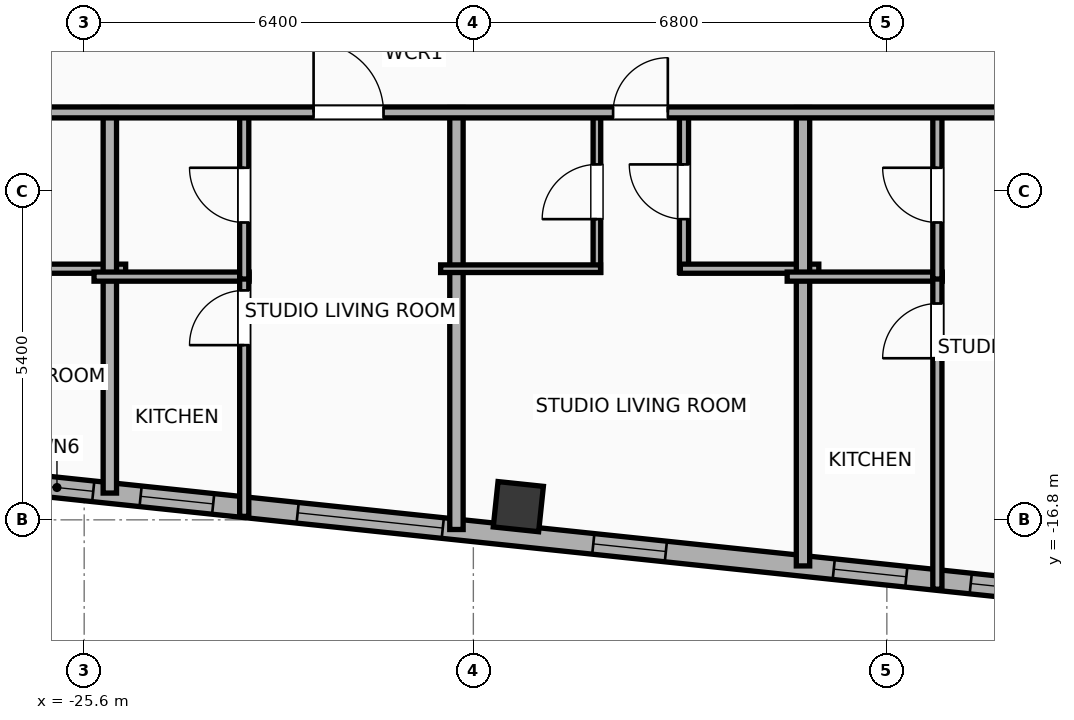
"""IFC4 building model, lengths in metres.
Left out: names, types, materials, properties, quantities, classifications, styles, units other than length and angle.
Written with IfcOpenShell. Run it as: python <this file> out.ifc"""

import sys

from ifc_helpers import new_model, si_unit, direction, frame, frame_2d, origin, origin_2d, place, context, subcontext, project, spatial, rectangle, hollow_rectangle, extrude, element, fill, save


model = new_model("IFC4")
c1 = context("Model", 3, precision=1e-05, world=origin(), true_north=direction((0.0, 1.0)))
c2 = subcontext(c1, "Body", "Model", "MODEL_VIEW")
j1 = project(units=[si_unit("LENGTHUNIT", "METRE"), si_unit("PLANEANGLEUNIT", "RADIAN")], contexts=[c1])
p1 = place(None, origin())
s1 = spatial("IfcSite", under=j1, at=p1, CompositionType="ELEMENT")
p2 = place(p1, origin())
s2 = spatial("IfcBuilding", under=s1, at=p2, CompositionType="ELEMENT")
p3 = place(p2, frame((0.0, 0.0, 271.7)))
s3 = spatial("IfcBuildingStorey", under=s2, at=p3, CompositionType="ELEMENT", Elevation=271.7)
p4 = place(p3, frame((-18.46, -16.583, 0.0), z_axis=(0.0, 0.0, 1.0), x_axis=(0.994521895368, -0.104528463268, 0.0)))
e1 = element("IfcColumn", 1, at=p4, inside=s3, PredefinedType="COLUMN", context=c2, shape_type="SweptSolid", body=[
    extrude(hollow_rectangle(XDim=0.75, YDim=0.75, WallThickness=0.025, at=origin_2d()), origin(), (0.0, 0.0, 1.0), 3.9),
])
p5 = place(p3, frame((18.708, -20.972, 0.0), z_axis=(0.0, 0.0, 1.0), x_axis=(-0.994521888554, 0.104528528102, 0.0)))
e2 = element("IfcWall", 2, at=p5, inside=s3, PredefinedType="ELEMENTEDWALL", context=c2, shape_type="SweptSolid", body=[
    extrude(rectangle(XDim=46.766, YDim=0.34, at=frame_2d((23.383, 0.0))), origin(), (0.0, 0.0, 1.0), 3.65),
])
p6 = place(p5, frame((23.833, 0.0, 0.75)))
e3 = element("IfcOpeningElement", 3, at=p6, cuts=e2, PredefinedType="OPENING", context=c2, shape_type="SweptSolid", body=[
    extrude(rectangle(XDim=2.4, YDim=2.1, at=frame_2d((1.2, 1.05))), frame((0.0, 0.18, 0.0), z_axis=(0.0, -1.0, 0.0), x_axis=(1.0, 0.0, 0.0)), (0.0, 0.0, 1.0), 0.36),
])
p7 = place(p5, frame((38.622, 0.0, 0.75)))
e4 = element("IfcOpeningElement", 4, at=p7, cuts=e2, PredefinedType="OPENING", context=c2, shape_type="SweptSolid", body=[
    extrude(rectangle(XDim=2.4, YDim=2.1, at=frame_2d((1.2, 1.05))), frame((0.0, 0.18, 0.0), z_axis=(0.0, -1.0, 0.0), x_axis=(1.0, 0.0, 0.0)), (0.0, 0.0, 1.0), 0.36),
])
p8 = place(p5, frame((44.402, 0.0, 0.75)))
e5 = element("IfcOpeningElement", 5, at=p8, cuts=e2, PredefinedType="OPENING", context=c2, shape_type="SweptSolid", body=[
    extrude(rectangle(XDim=1.2, YDim=2.05, at=frame_2d((0.6, 1.025))), frame((0.0, 0.18, 0.0), z_axis=(0.0, -1.0, 0.0), x_axis=(1.0, 0.0, 0.0)), (0.0, 0.0, 1.0), 0.36),
])
p9 = place(p5, frame((42.419, 0.0, 0.75)))
e6 = element("IfcOpeningElement", 6, at=p9, cuts=e2, PredefinedType="OPENING", context=c2, shape_type="SweptSolid", body=[
    extrude(rectangle(XDim=1.2, YDim=2.05, at=frame_2d((0.6, 1.025))), frame((0.0, 0.18, 0.0), z_axis=(0.0, -1.0, 0.0), x_axis=(1.0, 0.0, 0.0)), (0.0, 0.0, 1.0), 0.36),
])
p10 = place(p5, frame((34.933, 0.0, 0.75)))
e7 = element("IfcOpeningElement", 7, at=p10, cuts=e2, PredefinedType="OPENING", context=c2, shape_type="SweptSolid", body=[
    extrude(rectangle(XDim=1.2, YDim=2.05, at=frame_2d((0.6, 1.025))), frame((0.0, 0.18, 0.0), z_axis=(0.0, -1.0, 0.0), x_axis=(1.0, 0.0, 0.0)), (0.0, 0.0, 1.0), 0.36),
])
p11 = place(p5, frame((28.692, 0.0, 0.75)))
e8 = element("IfcOpeningElement", 8, at=p11, cuts=e2, PredefinedType="OPENING", context=c2, shape_type="SweptSolid", body=[
    extrude(rectangle(XDim=1.2, YDim=2.05, at=frame_2d((0.6, 1.025))), frame((0.0, 0.18, 0.0), z_axis=(0.0, -1.0, 0.0), x_axis=(1.0, 0.0, 0.0)), (0.0, 0.0, 1.0), 0.36),
])
p12 = place(p5, frame((30.957, 0.0, 0.75)))
e9 = element("IfcOpeningElement", 9, at=p12, cuts=e2, PredefinedType="OPENING", context=c2, shape_type="SweptSolid", body=[
    extrude(rectangle(XDim=1.2, YDim=2.05, at=frame_2d((0.6, 1.025))), frame((0.0, 0.18, 0.0), z_axis=(0.0, -1.0, 0.0), x_axis=(1.0, 0.0, 0.0)), (0.0, 0.0, 1.0), 0.36),
])
p13 = place(p5, frame((7.492, 0.0, 0.75)))
e10 = element("IfcOpeningElement", 10, at=p13, cuts=e2, PredefinedType="OPENING", context=c2, shape_type="SweptSolid", body=[
    extrude(rectangle(XDim=1.2, YDim=2.05, at=frame_2d((0.6, 1.025))), frame((0.0, 0.18, 0.0), z_axis=(0.0, -1.0, 0.0), x_axis=(1.0, 0.0, 0.0)), (0.0, 0.0, 1.0), 0.36),
])
p14 = place(p5, frame((4.141, 0.0, 0.75)))
e11 = element("IfcOpeningElement", 11, at=p14, cuts=e2, PredefinedType="OPENING", context=c2, shape_type="SweptSolid", body=[
    extrude(rectangle(XDim=1.2, YDim=2.05, at=frame_2d((0.6, 1.025))), frame((0.0, 0.18, 0.0), z_axis=(0.0, -1.0, 0.0), x_axis=(1.0, 0.0, 0.0)), (0.0, 0.0, 1.0), 0.36),
])
p15 = place(p5, frame((1.36, 0.0, 0.75)))
e12 = element("IfcOpeningElement", 12, at=p15, cuts=e2, PredefinedType="OPENING", context=c2, shape_type="SweptSolid", body=[
    extrude(rectangle(XDim=1.2, YDim=2.05, at=frame_2d((0.6, 1.025))), frame((0.0, 0.18, 0.0), z_axis=(0.0, -1.0, 0.0), x_axis=(1.0, 0.0, 0.0)), (0.0, 0.0, 1.0), 0.36),
])
p16 = place(p5, frame((20.254, 0.0, 0.75)))
e13 = element("IfcOpeningElement", 13, at=p16, cuts=e2, PredefinedType="OPENING", context=c2, shape_type="SweptSolid", body=[
    extrude(rectangle(XDim=1.2, YDim=2.05, at=frame_2d((0.6, 1.025))), frame((0.0, 0.18, 0.0), z_axis=(0.0, -1.0, 0.0), x_axis=(1.0, 0.0, 0.0)), (0.0, 0.0, 1.0), 0.36),
])
p17 = place(p5, frame((16.172, 0.0, 0.75)))
e14 = element("IfcOpeningElement", 14, at=p17, cuts=e2, PredefinedType="OPENING", context=c2, shape_type="SweptSolid", body=[
    extrude(rectangle(XDim=1.2, YDim=2.05, at=frame_2d((0.6, 1.025))), frame((0.0, 0.18, 0.0), z_axis=(0.0, -1.0, 0.0), x_axis=(1.0, 0.0, 0.0)), (0.0, 0.0, 1.0), 0.36),
])
p18 = place(p5, frame((12.11, 0.0, 0.75)))
e15 = element("IfcOpeningElement", 15, at=p18, cuts=e2, PredefinedType="OPENING", context=c2, shape_type="SweptSolid", body=[
    extrude(rectangle(XDim=1.2, YDim=2.05, at=frame_2d((0.6, 1.025))), frame((0.0, 0.18, 0.0), z_axis=(0.0, -1.0, 0.0), x_axis=(1.0, 0.0, 0.0)), (0.0, 0.0, 1.0), 0.36),
])
p19 = place(p3, frame((-27.215, -12.67, 0.0), z_axis=(0.0, 0.0, 1.0), x_axis=(1.0, 0.0, 0.0)))
e16 = element("IfcWall", 16, at=p19, inside=s3, PredefinedType="PLUMBINGWALL", context=c2, shape_type="SweptSolid", body=[
    extrude(rectangle(XDim=2.297, YDim=0.15, at=frame_2d((1.148, 0.0))), origin(), (0.0, 0.0, 1.0), 3.65),
])
p20 = place(p3, frame((-25.178, -16.36, 0.0), z_axis=(0.0, 0.0, 1.0), x_axis=(0.0, 1.0, 0.0)))
e17 = element("IfcWall", 17, at=p20, inside=s3, PredefinedType="PARTITIONING", context=c2, shape_type="SweptSolid", body=[
    extrude(rectangle(XDim=6.34, YDim=0.22, at=frame_2d((3.17, 0.0))), origin(), (0.0, 0.0, 1.0), 3.65),
])
p21 = place(p3, frame((-25.438, -12.8, 0.0), z_axis=(0.0, 0.0, 1.0), x_axis=(1.0, 0.0, 0.0)))
e18 = element("IfcWall", 18, at=p21, inside=s3, PredefinedType="PLUMBINGWALL", context=c2, shape_type="SweptSolid", body=[
    extrude(rectangle(XDim=2.55, YDim=0.15, at=frame_2d((1.275, 0.0))), origin(), (0.0, 0.0, 1.0), 3.65),
])
p22 = place(p3, frame((-22.968, -16.743, 0.0), z_axis=(0.0, 0.0, 1.0), x_axis=(0.0, 1.0, 0.0)))
e19 = element("IfcWall", 19, at=p22, inside=s3, PredefinedType="PLUMBINGWALL", context=c2, shape_type="SweptSolid", body=[
    extrude(rectangle(XDim=3.983, YDim=0.15, at=frame_2d((1.991, 0.0))), origin(), (0.0, 0.0, 1.0), 3.65),
])
p23 = place(p22, frame((2.816, 0.0, 0.0)))
e20 = element("IfcOpeningElement", 20, at=p23, cuts=e19, PredefinedType="OPENING", context=c2, shape_type="SweptSolid", body=[
    extrude(rectangle(XDim=0.9, YDim=2.05, at=frame_2d((0.45, 1.025))), frame((0.0, 0.085, 0.0), z_axis=(0.0, -1.0, 0.0), x_axis=(1.0, 0.0, 0.0)), (0.0, 0.0, 1.0), 0.17),
])
p24 = place(p3, frame((-22.968, -12.84, 0.0), z_axis=(0.0, 0.0, 1.0), x_axis=(0.0, 1.0, 0.0)))
e21 = element("IfcWall", 21, at=p24, inside=s3, PredefinedType="PLUMBINGWALL", context=c2, shape_type="SweptSolid", body=[
    extrude(rectangle(XDim=2.76, YDim=0.15, at=frame_2d((1.38, 0.0))), origin(), (0.0, 0.0, 1.0), 3.65),
])
p25 = place(p24, frame((0.93, 0.0, 0.0)))
e22 = element("IfcOpeningElement", 22, at=p25, cuts=e21, PredefinedType="OPENING", context=c2, shape_type="SweptSolid", body=[
    extrude(rectangle(XDim=0.9, YDim=2.05, at=frame_2d((0.45, 1.025))), frame((0.0, 0.085, 0.0), z_axis=(0.0, -1.0, 0.0), x_axis=(1.0, 0.0, 0.0)), (0.0, 0.0, 1.0), 0.17),
])
p26 = place(p3, frame((-19.478, -16.959, 0.0), z_axis=(0.0, 0.0, 1.0), x_axis=(0.0, 1.0, 0.0)))
e23 = element("IfcWall", 23, at=p26, inside=s3, PredefinedType="PARTITIONING", context=c2, shape_type="SweptSolid", body=[
    extrude(rectangle(XDim=6.939, YDim=0.22, at=frame_2d((3.469, 0.0))), origin(), (0.0, 0.0, 1.0), 3.65),
])
p27 = place(p3, frame((-17.168, -12.73, 0.0), z_axis=(0.0, 0.0, 1.0), x_axis=(0.0, 1.0, 0.0)))
e24 = element("IfcWall", 24, at=p27, inside=s3, PredefinedType="PARTITIONING", context=c2, shape_type="SweptSolid", body=[
    extrude(rectangle(XDim=2.65, YDim=0.125, at=frame_2d((1.325, 0.0))), origin(), (0.0, 0.0, 1.0), 3.65),
])
p28 = place(p27, frame((0.875, 0.0, 0.0)))
e25 = element("IfcOpeningElement", 25, at=p28, cuts=e24, PredefinedType="OPENING", context=c2, shape_type="SweptSolid", body=[
    extrude(rectangle(XDim=0.9, YDim=2.05, at=frame_2d((0.45, 1.025))), frame((0.0, 0.073, 0.0), z_axis=(0.0, -1.0, 0.0), x_axis=(1.0, 0.0, 0.0)), (0.0, 0.0, 1.0), 0.145),
])
p29 = place(p3, frame((-15.736, -12.73, 0.0), z_axis=(0.0, 0.0, 1.0), x_axis=(0.0, 1.0, 0.0)))
e26 = element("IfcWall", 26, at=p29, inside=s3, PredefinedType="PLUMBINGWALL", context=c2, shape_type="SweptSolid", body=[
    extrude(rectangle(XDim=2.65, YDim=0.15, at=frame_2d((1.325, 0.0))), origin(), (0.0, 0.0, 1.0), 3.65),
])
p30 = place(p29, frame((0.875, 0.0, 0.0)))
e27 = element("IfcOpeningElement", 27, at=p30, cuts=e26, PredefinedType="OPENING", context=c2, shape_type="SweptSolid", body=[
    extrude(rectangle(XDim=0.9, YDim=2.05, at=frame_2d((0.45, 1.025))), frame((0.0, 0.085, 0.0), z_axis=(0.0, -1.0, 0.0), x_axis=(1.0, 0.0, 0.0)), (0.0, 0.0, 1.0), 0.17),
])
p31 = place(p3, frame((-19.738, -12.67, 0.0), z_axis=(0.0, 0.0, 1.0), x_axis=(1.0, 0.0, 0.0)))
e28 = element("IfcWall", 28, at=p31, inside=s3, PredefinedType="PARTITIONING", context=c2, shape_type="SweptSolid", body=[
    extrude(rectangle(XDim=2.63, YDim=0.125, at=frame_2d((1.315, 0.0))), origin(), (0.0, 0.0, 1.0), 3.65),
])
p32 = place(p3, frame((-15.796, -12.67, 0.0), z_axis=(0.0, 0.0, 1.0), x_axis=(1.0, 0.0, 0.0)))
e29 = element("IfcWall", 29, at=p32, inside=s3, PredefinedType="PLUMBINGWALL", context=c2, shape_type="SweptSolid", body=[
    extrude(rectangle(XDim=2.277, YDim=0.15, at=frame_2d((1.138, 0.0))), origin(), (0.0, 0.0, 1.0), 3.65),
])
p33 = place(p3, frame((-13.779, -17.558, 0.0), z_axis=(0.0, 0.0, 1.0), x_axis=(0.0, 1.0, 0.0)))
e30 = element("IfcWall", 30, at=p33, inside=s3, PredefinedType="PARTITIONING", context=c2, shape_type="SweptSolid", body=[
    extrude(rectangle(XDim=7.538, YDim=0.22, at=frame_2d((3.769, 0.0))), origin(), (0.0, 0.0, 1.0), 3.65),
])
p34 = place(p3, frame((-14.039, -12.8, 0.0), z_axis=(0.0, 0.0, 1.0), x_axis=(1.0, 0.0, 0.0)))
e31 = element("IfcWall", 31, at=p34, inside=s3, PredefinedType="PLUMBINGWALL", context=c2, shape_type="SweptSolid", body=[
    extrude(rectangle(XDim=2.55, YDim=0.15, at=frame_2d((1.275, 0.0))), origin(), (0.0, 0.0, 1.0), 3.65),
])
p35 = place(p3, frame((-11.569, -17.941, 0.0), z_axis=(0.0, 0.0, 1.0), x_axis=(0.0, 1.0, 0.0)))
e32 = element("IfcWall", 32, at=p35, inside=s3, PredefinedType="PLUMBINGWALL", context=c2, shape_type="SweptSolid", body=[
    extrude(rectangle(XDim=5.181, YDim=0.15, at=frame_2d((2.59, 0.0))), origin(), (0.0, 0.0, 1.0), 3.65),
])
p36 = place(p35, frame((3.798, 0.0, 0.0)))
e33 = element("IfcOpeningElement", 33, at=p36, cuts=e32, PredefinedType="OPENING", context=c2, shape_type="SweptSolid", body=[
    extrude(rectangle(XDim=0.9, YDim=2.05, at=frame_2d((0.45, 1.025))), frame((0.0, 0.085, 0.0), z_axis=(0.0, -1.0, 0.0), x_axis=(1.0, 0.0, 0.0)), (0.0, 0.0, 1.0), 0.17),
])
p37 = place(p3, frame((-11.569, -12.84, 0.0), z_axis=(0.0, 0.0, 1.0), x_axis=(0.0, 1.0, 0.0)))
e34 = element("IfcWall", 34, at=p37, inside=s3, PredefinedType="PLUMBINGWALL", context=c2, shape_type="SweptSolid", body=[
    extrude(rectangle(XDim=2.76, YDim=0.15, at=frame_2d((1.38, 0.0))), origin(), (0.0, 0.0, 1.0), 3.09),
])
p38 = place(p37, frame((0.93, 0.0, 0.0)))
e35 = element("IfcOpeningElement", 35, at=p38, cuts=e34, PredefinedType="OPENING", context=c2, shape_type="SweptSolid", body=[
    extrude(rectangle(XDim=0.9, YDim=2.05, at=frame_2d((0.45, 1.025))), frame((0.0, 0.085, 0.0), z_axis=(0.0, -1.0, 0.0), x_axis=(1.0, 0.0, 0.0)), (0.0, 0.0, 1.0), 0.17),
])
p39 = place(p3, frame((-30.639, -10.1, 0.0), z_axis=(0.0, 0.0, 1.0), x_axis=(1.0, 0.0, 0.0)))
e36 = element("IfcWall", 36, at=p39, inside=s3, PredefinedType="PARTITIONING", context=c2, shape_type="SweptSolid", body=[
    extrude(rectangle(XDim=22.559, YDim=0.18, at=frame_2d((11.28, 0.0))), origin(), (0.0, 0.0, 1.0), 3.65),
])
p40 = place(p39, frame((2.298, 0.0, 0.0)))
e37 = element("IfcOpeningElement", 37, at=p40, cuts=e36, PredefinedType="OPENING", context=c2, shape_type="SweptSolid", body=[
    extrude(rectangle(XDim=0.9, YDim=2.05, at=frame_2d((0.45, 1.025))), frame((0.0, 0.1, 0.0), z_axis=(0.0, -1.0, 0.0), x_axis=(1.0, 0.0, 0.0)), (0.0, 0.0, 1.0), 0.2),
])
p41 = place(p39, frame((8.812, 0.0, 0.0)))
e38 = element("IfcOpeningElement", 38, at=p41, cuts=e36, PredefinedType="OPENING", context=c2, shape_type="SweptSolid", body=[
    extrude(rectangle(XDim=1.15, YDim=2.05, at=frame_2d((0.575, 1.025))), frame((0.0, 0.1, 0.0), z_axis=(0.0, -1.0, 0.0), x_axis=(1.0, 0.0, 0.0)), (0.0, 0.0, 1.0), 0.2),
])
p42 = place(p39, frame((13.738, 0.0, 0.0)))
e39 = element("IfcOpeningElement", 39, at=p42, cuts=e36, PredefinedType="OPENING", context=c2, shape_type="SweptSolid", body=[
    extrude(rectangle(XDim=0.9, YDim=2.05, at=frame_2d((0.45, 1.025))), frame((0.0, 0.1, 0.0), z_axis=(0.0, -1.0, 0.0), x_axis=(1.0, 0.0, 0.0)), (0.0, 0.0, 1.0), 0.2),
])
p43 = place(p39, frame((20.209, 0.0, 0.0)))
e40 = element("IfcOpeningElement", 40, at=p43, cuts=e36, PredefinedType="OPENING", context=c2, shape_type="SweptSolid", body=[
    extrude(rectangle(XDim=1.15, YDim=2.05, at=frame_2d((0.575, 1.025))), frame((0.0, 0.1, 0.0), z_axis=(0.0, -1.0, 0.0), x_axis=(1.0, 0.0, 0.0)), (0.0, 0.0, 1.0), 0.2),
])
p44 = place(p7, origin())
e41 = element("IfcWindow", 41, at=p44, inside=s3, PartitioningType="SINGLE_PANEL", PredefinedType="WINDOW", context=c2, shape_type="SweptSolid", body=[
    extrude(rectangle(XDim=2.4, YDim=2.1, at=frame_2d((1.2, 1.05))), frame((0.0, 0.03, 0.0), z_axis=(0.0, -1.0, 0.0), x_axis=(1.0, 0.0, 0.0)), (0.0, 0.0, 1.0), 0.06),
])
fill(e4, e41)
p45 = place(p8, origin())
e42 = element("IfcWindow", 42, at=p45, inside=s3, PartitioningType="SINGLE_PANEL", PredefinedType="WINDOW", context=c2, shape_type="SweptSolid", body=[
    extrude(rectangle(XDim=1.2, YDim=2.05, at=frame_2d((0.6, 1.025))), frame((0.0, 0.03, 0.0), z_axis=(0.0, -1.0, 0.0), x_axis=(1.0, 0.0, 0.0)), (0.0, 0.0, 1.0), 0.06),
])
fill(e5, e42)
p46 = place(p9, origin())
e43 = element("IfcWindow", 43, at=p46, inside=s3, PartitioningType="SINGLE_PANEL", PredefinedType="WINDOW", context=c2, shape_type="SweptSolid", body=[
    extrude(rectangle(XDim=1.2, YDim=2.05, at=frame_2d((0.6, 1.025))), frame((0.0, 0.03, 0.0), z_axis=(0.0, -1.0, 0.0), x_axis=(1.0, 0.0, 0.0)), (0.0, 0.0, 1.0), 0.06),
])
fill(e6, e43)
p47 = place(p10, origin())
e44 = element("IfcWindow", 44, at=p47, inside=s3, PartitioningType="SINGLE_PANEL", PredefinedType="WINDOW", context=c2, shape_type="SweptSolid", body=[
    extrude(rectangle(XDim=1.2, YDim=2.05, at=frame_2d((0.6, 1.025))), frame((0.0, 0.03, 0.0), z_axis=(0.0, -1.0, 0.0), x_axis=(1.0, 0.0, 0.0)), (0.0, 0.0, 1.0), 0.06),
])
fill(e7, e44)
p48 = place(p11, origin())
e45 = element("IfcWindow", 45, at=p48, inside=s3, PartitioningType="SINGLE_PANEL", PredefinedType="WINDOW", context=c2, shape_type="SweptSolid", body=[
    extrude(rectangle(XDim=1.2, YDim=2.05, at=frame_2d((0.6, 1.025))), frame((0.0, 0.03, 0.0), z_axis=(0.0, -1.0, 0.0), x_axis=(1.0, 0.0, 0.0)), (0.0, 0.0, 1.0), 0.06),
])
fill(e8, e45)
p49 = place(p12, origin())
e46 = element("IfcWindow", 46, at=p49, inside=s3, PartitioningType="SINGLE_PANEL", PredefinedType="WINDOW", context=c2, shape_type="SweptSolid", body=[
    extrude(rectangle(XDim=1.2, YDim=2.05, at=frame_2d((0.6, 1.025))), frame((0.0, 0.03, 0.0), z_axis=(0.0, -1.0, 0.0), x_axis=(1.0, 0.0, 0.0)), (0.0, 0.0, 1.0), 0.06),
])
fill(e9, e46)
p50 = place(p23, origin())
e47 = element("IfcDoor", 47, at=p50, inside=s3, OperationType="SINGLE_SWING_LEFT", PredefinedType="DOOR", context=c2, shape_type="SweptSolid", body=[
    extrude(rectangle(XDim=0.9, YDim=2.05, at=frame_2d((0.45, 1.025))), frame((0.0, 0.025, 0.0), z_axis=(0.0, -1.0, 0.0), x_axis=(1.0, 0.0, 0.0)), (0.0, 0.0, 1.0), 0.05),
])
fill(e20, e47)
p51 = place(p25, origin())
e48 = element("IfcDoor", 48, at=p51, inside=s3, OperationType="SINGLE_SWING_RIGHT", PredefinedType="DOOR", context=c2, shape_type="SweptSolid", body=[
    extrude(rectangle(XDim=0.9, YDim=2.05, at=frame_2d((0.45, 1.025))), frame((0.0, 0.025, 0.0), z_axis=(0.0, -1.0, 0.0), x_axis=(1.0, 0.0, 0.0)), (0.0, 0.0, 1.0), 0.05),
])
fill(e22, e48)
p52 = place(p28, origin())
e49 = element("IfcDoor", 49, at=p52, inside=s3, OperationType="SINGLE_SWING_LEFT", PredefinedType="DOOR", context=c2, shape_type="SweptSolid", body=[
    extrude(rectangle(XDim=0.9, YDim=2.05, at=frame_2d((0.45, 1.025))), frame((0.0, 0.025, 0.0), z_axis=(0.0, -1.0, 0.0), x_axis=(1.0, 0.0, 0.0)), (0.0, 0.0, 1.0), 0.05),
])
fill(e25, e49)
p53 = place(p30, origin())
e50 = element("IfcDoor", 50, at=p53, inside=s3, OperationType="SINGLE_SWING_RIGHT", PredefinedType="DOOR", context=c2, shape_type="SweptSolid", body=[
    extrude(rectangle(XDim=0.9, YDim=2.05, at=frame_2d((0.45, 1.025))), frame((0.0, 0.025, 0.0), z_axis=(0.0, -1.0, 0.0), x_axis=(1.0, 0.0, 0.0)), (0.0, 0.0, 1.0), 0.05),
])
fill(e27, e50)
p54 = place(p36, origin())
e51 = element("IfcDoor", 51, at=p54, inside=s3, OperationType="SINGLE_SWING_LEFT", PredefinedType="DOOR", context=c2, shape_type="SweptSolid", body=[
    extrude(rectangle(XDim=0.9, YDim=2.05, at=frame_2d((0.45, 1.025))), frame((0.0, 0.025, 0.0), z_axis=(0.0, -1.0, 0.0), x_axis=(1.0, 0.0, 0.0)), (0.0, 0.0, 1.0), 0.05),
])
fill(e33, e51)
p55 = place(p38, origin())
e52 = element("IfcDoor", 52, at=p55, inside=s3, OperationType="SINGLE_SWING_RIGHT", PredefinedType="DOOR", context=c2, shape_type="SweptSolid", body=[
    extrude(rectangle(XDim=0.9, YDim=2.05, at=frame_2d((0.45, 1.025))), frame((0.0, 0.025, 0.0), z_axis=(0.0, -1.0, 0.0), x_axis=(1.0, 0.0, 0.0)), (0.0, 0.0, 1.0), 0.05),
])
fill(e35, e52)
p56 = place(p41, origin())
e53 = element("IfcDoor", 53, at=p56, inside=s3, OperationType="SINGLE_SWING_LEFT", PredefinedType="DOOR", context=c2, shape_type="SweptSolid", body=[
    extrude(rectangle(XDim=1.15, YDim=2.05, at=frame_2d((0.575, 1.025))), frame((0.0, 0.025, 0.0), z_axis=(0.0, -1.0, 0.0), x_axis=(1.0, 0.0, 0.0)), (0.0, 0.0, 1.0), 0.05),
])
fill(e38, e53)
p57 = place(p42, origin())
e54 = element("IfcDoor", 54, at=p57, inside=s3, OperationType="SINGLE_SWING_RIGHT", PredefinedType="DOOR", context=c2, shape_type="SweptSolid", body=[
    extrude(rectangle(XDim=0.9, YDim=2.05, at=frame_2d((0.45, 1.025))), frame((0.0, 0.025, 0.0), z_axis=(0.0, -1.0, 0.0), x_axis=(1.0, 0.0, 0.0)), (0.0, 0.0, 1.0), 0.05),
])
fill(e39, e54)
save(model, sys.argv[1])
